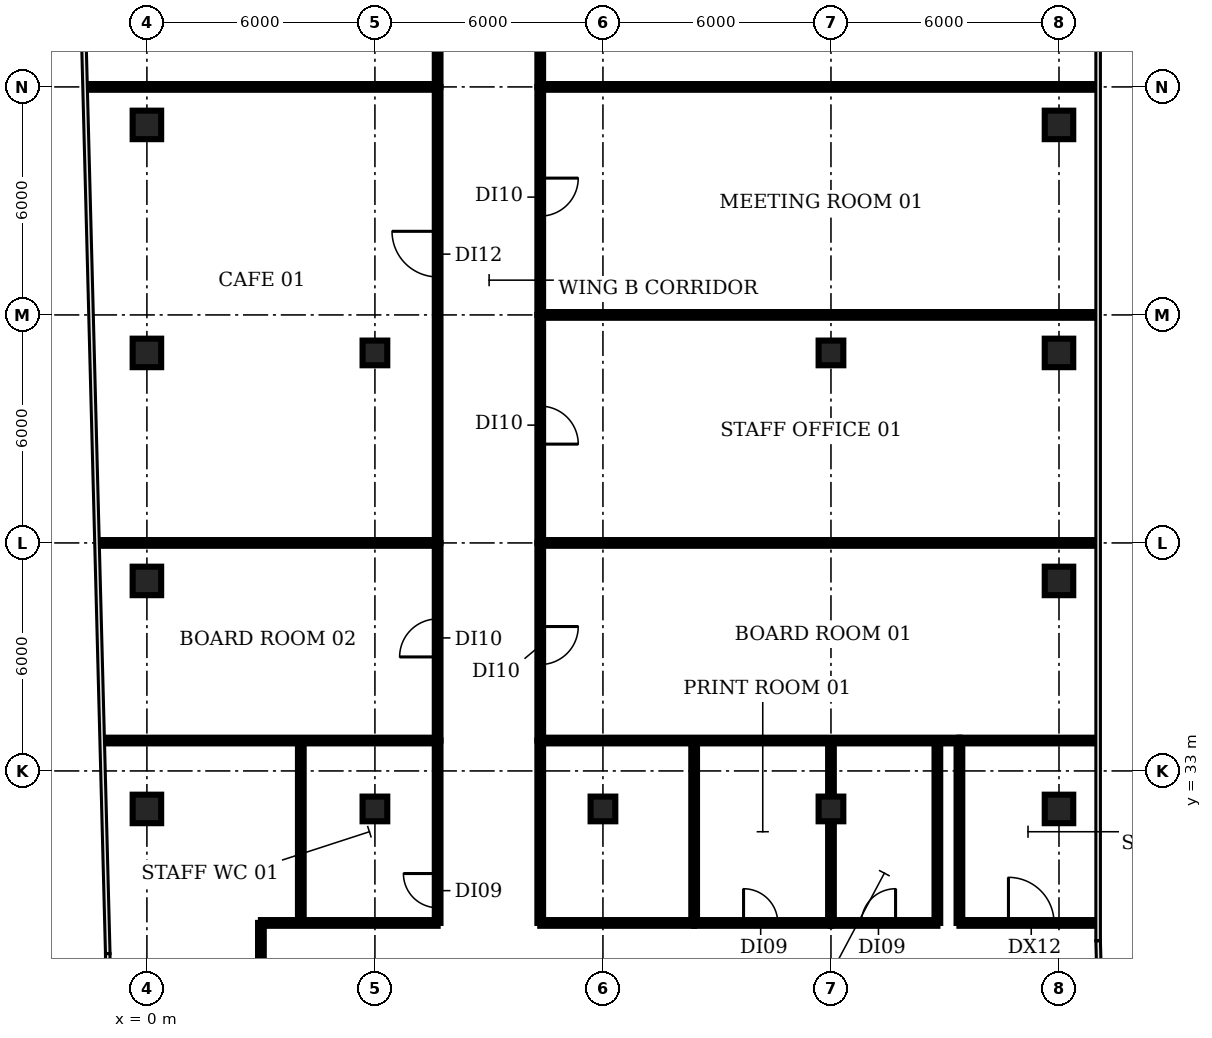
"""IFC4 building model, lengths in metres.
Left out: names, types, materials, properties, quantities, classifications, styles, units other than length and angle.
Written with IfcOpenShell. Run it as: python <this file> out.ifc"""

import sys

from ifc_helpers import new_model, si_unit, direction, frame, frame_2d, origin, origin_2d, place, context, subcontext, project, spatial, rectangle, extrude, element, fill, save


model = new_model("IFC4")
c1 = context("Model", 3, precision=1e-05, world=origin(), true_north=direction((0.0, 1.0)))
c2 = subcontext(c1, "Body", "Model", "MODEL_VIEW")
j1 = project(units=[si_unit("LENGTHUNIT", "METRE"), si_unit("PLANEANGLEUNIT", "RADIAN")], contexts=[c1])
p1 = place(None, origin())
s1 = spatial("IfcSite", under=j1, at=p1, CompositionType="ELEMENT")
p2 = place(p1, origin())
s2 = spatial("IfcBuilding", under=s1, at=p2, CompositionType="ELEMENT")
p3 = place(p2, frame((0.0, 0.0, 293.6)))
s3 = spatial("IfcBuildingStorey", under=s2, at=p3, CompositionType="ELEMENT", Elevation=293.6)
for number, where, z_axis, x_axis in (
    (1, (0.0, 32.0, 0.0), (0.0, 0.0, 1.0), (1.0, 0.0, 0.0)),
    (2, (0.0, 38.0, 0.0), (0.0, 0.0, 1.0), (1.0, 0.0, 0.0)),
    (3, (0.0, 44.0, 0.0), (0.0, 0.0, 1.0), (1.0, 0.0, 0.0)),
    (4, (0.0, 50.0, 0.0), (0.0, 0.0, 1.0), (1.0, 0.0, 0.0)),
):
    element("IfcColumn", number, at=place(p3, frame(where, z_axis=z_axis, x_axis=x_axis)), inside=s3, PredefinedType="COLUMN", context=c2, shape_type="SweptSolid", body=[
        extrude(rectangle(XDim=0.75, YDim=0.75, at=origin_2d()), origin(), (0.0, 0.0, 1.0), 3.85),
    ])
for number, where, z_axis, x_axis in (
    (5, (6.0, 32.0, 0.0), (0.0, 0.0, 1.0), (1.0, 0.0, 0.0)),
    (6, (6.0, 44.0, 0.0), (0.0, 0.0, 1.0), (1.0, 0.0, 0.0)),
    (7, (12.0, 32.0, 0.0), (0.0, 0.0, 1.0), (1.0, 0.0, 0.0)),
    (8, (18.0, 32.0, 0.0), (0.0, 0.0, 1.0), (1.0, 0.0, 0.0)),
    (9, (18.0, 44.0, 0.0), (0.0, 0.0, 1.0), (1.0, 0.0, 0.0)),
):
    element("IfcColumn", number, at=place(p3, frame(where, z_axis=z_axis, x_axis=x_axis)), inside=s3, PredefinedType="COLUMN", context=c2, shape_type="SweptSolid", body=[
        extrude(rectangle(XDim=0.65, YDim=0.65, at=origin_2d()), origin(), (0.0, 0.0, 1.0), 3.85),
    ])
for number, where, z_axis, x_axis in (
    (10, (24.0, 32.0, 0.0), (0.0, 0.0, 1.0), (1.0, 0.0, 0.0)),
    (11, (24.0, 38.0, 0.0), (0.0, 0.0, 1.0), (1.0, 0.0, 0.0)),
    (12, (24.0, 44.0, 0.0), (0.0, 0.0, 1.0), (1.0, 0.0, 0.0)),
    (13, (24.0, 50.0, 0.0), (0.0, 0.0, 1.0), (1.0, 0.0, 0.0)),
):
    element("IfcColumn", number, at=place(p3, frame(where, z_axis=z_axis, x_axis=x_axis)), inside=s3, PredefinedType="COLUMN", context=c2, shape_type="SweptSolid", body=[
        extrude(rectangle(XDim=0.75, YDim=0.75, at=origin_2d()), origin(), (0.0, 0.0, 1.0), 3.85),
    ])
p4 = place(p3, frame((-1.566, 51.0, 0.0), z_axis=(0.0, 0.0, 1.0), x_axis=(1.0, 0.0, 0.0)))
e14 = element("IfcWall", 14, at=p4, inside=s3, PredefinedType="PARTITIONING", context=c2, shape_type="SweptSolid", body=[
    extrude(rectangle(XDim=9.216, YDim=0.15, at=frame_2d((4.608, 0.0))), origin(), (0.0, 0.0, 1.0), 2.9),
])
p5 = place(p3, frame((-1.26, 39.0, 0.0), z_axis=(0.0, 0.0, 1.0), x_axis=(1.0, 0.0, 0.0)))
e15 = element("IfcWall", 15, at=p5, inside=s3, PredefinedType="PARTITIONING", context=c2, shape_type="SweptSolid", body=[
    extrude(rectangle(XDim=8.91, YDim=0.15, at=frame_2d((4.455, 0.0))), origin(), (0.0, 0.0, 1.0), 2.9),
])
p6 = place(p3, frame((-1.115, 33.8, 0.0), z_axis=(0.0, 0.0, 1.0), x_axis=(1.0, 0.0, 0.0)))
e16 = element("IfcWall", 16, at=p6, inside=s3, PredefinedType="PARTITIONING", context=c2, shape_type="SweptSolid", body=[
    extrude(rectangle(XDim=8.765, YDim=0.15, at=frame_2d((4.383, 0.0))), origin(), (0.0, 0.0, 1.0), 2.9),
])
p7 = place(p3, frame((3.0, 25.1, 0.0), z_axis=(0.0, 0.0, 1.0), x_axis=(0.0, 1.0, 0.0)))
e17 = element("IfcWall", 17, at=p7, inside=s3, PredefinedType="PARTITIONING", context=c2, shape_type="SweptSolid", body=[
    extrude(rectangle(XDim=3.9, YDim=0.15, at=frame_2d((1.95, 0.0))), origin(), (0.0, 0.0, 1.0), 2.9),
])
p8 = place(p3, frame((3.0, 29.0, 0.0), z_axis=(0.0, 0.0, 1.0), x_axis=(1.0, 0.0, 0.0)))
e18 = element("IfcWall", 18, at=p8, inside=s3, PredefinedType="PARTITIONING", context=c2, shape_type="SweptSolid", body=[
    extrude(rectangle(XDim=4.65, YDim=0.15, at=frame_2d((2.325, 0.0))), origin(), (0.0, 0.0, 1.0), 2.9),
])
p9 = place(p3, frame((4.05, 29.0, 0.0), z_axis=(0.0, 0.0, 1.0), x_axis=(0.0, 1.0, 0.0)))
e19 = element("IfcWall", 19, at=p9, inside=s3, PredefinedType="PARTITIONING", context=c2, shape_type="SweptSolid", body=[
    extrude(rectangle(XDim=4.8, YDim=0.15, at=frame_2d((2.4, 0.0))), origin(), (0.0, 0.0, 1.0), 2.9),
])
p10 = place(p3, frame((7.65, 29.0, 0.0), z_axis=(0.0, 0.0, 1.0), x_axis=(0.0, 1.0, 0.0)))
e20 = element("IfcWall", 20, at=p10, inside=s3, PredefinedType="PARTITIONING", context=c2, shape_type="SweptSolid", body=[
    extrude(rectangle(XDim=4.8, YDim=0.15, at=frame_2d((2.4, 0.0))), origin(), (0.0, 0.0, 1.0), 2.9),
])
p11 = place(p10, frame((0.4, 0.0, 0.0)))
e21 = element("IfcOpeningElement", 21, at=p11, cuts=e20, PredefinedType="OPENING", context=c2, shape_type="SweptSolid", body=[
    extrude(rectangle(XDim=0.9, YDim=2.1, at=frame_2d((0.45, 1.05))), frame((0.0, 0.085, 0.0), z_axis=(0.0, -1.0, 0.0), x_axis=(1.0, 0.0, 0.0)), (0.0, 0.0, 1.0), 0.17),
])
p12 = place(p3, frame((7.65, 33.8, 0.0), z_axis=(0.0, 0.0, 1.0), x_axis=(0.0, 1.0, 0.0)))
e22 = element("IfcWall", 22, at=p12, inside=s3, PredefinedType="PARTITIONING", context=c2, shape_type="SweptSolid", body=[
    extrude(rectangle(XDim=5.2, YDim=0.15, at=frame_2d((2.6, 0.0))), origin(), (0.0, 0.0, 1.0), 2.9),
])
p13 = place(p12, frame((2.2, 0.0, 0.0)))
e23 = element("IfcOpeningElement", 23, at=p13, cuts=e22, PredefinedType="OPENING", context=c2, shape_type="SweptSolid", body=[
    extrude(rectangle(XDim=1.0, YDim=2.1, at=frame_2d((0.5, 1.05))), frame((0.0, 0.085, 0.0), z_axis=(0.0, -1.0, 0.0), x_axis=(1.0, 0.0, 0.0)), (0.0, 0.0, 1.0), 0.17),
])
p14 = place(p3, frame((7.65, 39.0, 0.0), z_axis=(0.0, 0.0, 1.0), x_axis=(0.0, 1.0, 0.0)))
e24 = element("IfcWall", 24, at=p14, inside=s3, PredefinedType="PARTITIONING", context=c2, shape_type="SweptSolid", body=[
    extrude(rectangle(XDim=12.0, YDim=0.15, at=frame_2d((6.0, 0.0))), origin(), (0.0, 0.0, 1.0), 2.9),
])
p15 = place(p14, frame((7.0, 0.0, 0.0)))
e25 = element("IfcOpeningElement", 25, at=p15, cuts=e24, PredefinedType="OPENING", context=c2, shape_type="SweptSolid", body=[
    extrude(rectangle(XDim=1.2, YDim=2.1, at=frame_2d((0.6, 1.05))), frame((0.0, 0.085, 0.0), z_axis=(0.0, -1.0, 0.0), x_axis=(1.0, 0.0, 0.0)), (0.0, 0.0, 1.0), 0.17),
])
p16 = place(p3, frame((7.65, 51.0, 0.0), z_axis=(0.0, 0.0, 1.0), x_axis=(0.0, 1.0, 0.0)))
e26 = element("IfcWall", 26, at=p16, inside=s3, PredefinedType="PARTITIONING", context=c2, shape_type="SweptSolid", body=[
    extrude(rectangle(XDim=6.0, YDim=0.15, at=frame_2d((3.0, 0.0))), origin(), (0.0, 0.0, 1.0), 2.9),
])
p17 = place(p16, frame((1.8, 0.0, 0.0)))
e27 = element("IfcOpeningElement", 27, at=p17, cuts=e26, PredefinedType="OPENING", context=c2, shape_type="SweptSolid", body=[
    extrude(rectangle(XDim=1.0, YDim=2.1, at=frame_2d((0.5, 1.05))), frame((0.0, 0.085, 0.0), z_axis=(0.0, -1.0, 0.0), x_axis=(1.0, 0.0, 0.0)), (0.0, 0.0, 1.0), 0.17),
])
p18 = place(p3, frame((10.35, 29.0, 0.0), z_axis=(0.0, 0.0, 1.0), x_axis=(0.0, 1.0, 0.0)))
e28 = element("IfcWall", 28, at=p18, inside=s3, PredefinedType="PARTITIONING", context=c2, shape_type="SweptSolid", body=[
    extrude(rectangle(XDim=4.8, YDim=0.15, at=frame_2d((2.4, 0.0))), origin(), (0.0, 0.0, 1.0), 2.9),
])
p19 = place(p3, frame((10.35, 29.0, 0.0), z_axis=(0.0, 0.0, 1.0), x_axis=(1.0, 0.0, 0.0)))
e29 = element("IfcWall", 29, at=p19, inside=s3, PredefinedType="PARTITIONING", context=c2, shape_type="SweptSolid", body=[
    extrude(rectangle(XDim=4.05, YDim=0.15, at=frame_2d((2.025, 0.0))), origin(), (0.0, 0.0, 1.0), 2.9),
])
p20 = place(p3, frame((10.35, 33.8, 0.0), z_axis=(0.0, 0.0, 1.0), x_axis=(1.0, 0.0, 0.0)))
e30 = element("IfcWall", 30, at=p20, inside=s3, PredefinedType="PARTITIONING", context=c2, shape_type="SweptSolid", body=[
    extrude(rectangle(XDim=11.03, YDim=0.15, at=frame_2d((5.515, 0.0))), origin(), (0.0, 0.0, 1.0), 2.9),
])
p21 = place(p3, frame((10.35, 39.0, 0.0), z_axis=(0.0, 0.0, 1.0), x_axis=(0.0, -1.0, 0.0)))
e31 = element("IfcWall", 31, at=p21, inside=s3, PredefinedType="PARTITIONING", context=c2, shape_type="SweptSolid", body=[
    extrude(rectangle(XDim=5.2, YDim=0.15, at=frame_2d((2.6, 0.0))), origin(), (0.0, 0.0, 1.0), 2.9),
])
p22 = place(p21, frame((2.2, 0.0, 0.0)))
e32 = element("IfcOpeningElement", 32, at=p22, cuts=e31, PredefinedType="OPENING", context=c2, shape_type="SweptSolid", body=[
    extrude(rectangle(XDim=1.0, YDim=2.1, at=frame_2d((0.5, 1.05))), frame((0.0, 0.085, 0.0), z_axis=(0.0, -1.0, 0.0), x_axis=(1.0, 0.0, 0.0)), (0.0, 0.0, 1.0), 0.17),
])
p23 = place(p3, frame((10.35, 39.0, 0.0), z_axis=(0.0, 0.0, 1.0), x_axis=(1.0, 0.0, 0.0)))
e33 = element("IfcWall", 33, at=p23, inside=s3, PredefinedType="PARTITIONING", context=c2, shape_type="SweptSolid", body=[
    extrude(rectangle(XDim=14.63, YDim=0.15, at=frame_2d((7.315, 0.0))), origin(), (0.0, 0.0, 1.0), 2.9),
])
p24 = place(p3, frame((10.35, 45.0, 0.0), z_axis=(0.0, 0.0, 1.0), x_axis=(0.0, -1.0, 0.0)))
e34 = element("IfcWall", 34, at=p24, inside=s3, PredefinedType="PARTITIONING", context=c2, shape_type="SweptSolid", body=[
    extrude(rectangle(XDim=6.0, YDim=0.15, at=frame_2d((3.0, 0.0))), origin(), (0.0, 0.0, 1.0), 2.9),
])
p25 = place(p24, frame((2.4, 0.0, 0.0)))
e35 = element("IfcOpeningElement", 35, at=p25, cuts=e34, PredefinedType="OPENING", context=c2, shape_type="SweptSolid", body=[
    extrude(rectangle(XDim=1.0, YDim=2.1, at=frame_2d((0.5, 1.05))), frame((0.0, 0.085, 0.0), z_axis=(0.0, -1.0, 0.0), x_axis=(1.0, 0.0, 0.0)), (0.0, 0.0, 1.0), 0.17),
])
p26 = place(p3, frame((10.35, 45.0, 0.0), z_axis=(0.0, 0.0, 1.0), x_axis=(1.0, 0.0, 0.0)))
e36 = element("IfcWall", 36, at=p26, inside=s3, PredefinedType="PARTITIONING", context=c2, shape_type="SweptSolid", body=[
    extrude(rectangle(XDim=14.63, YDim=0.15, at=frame_2d((7.315, 0.0))), origin(), (0.0, 0.0, 1.0), 2.9),
])
p27 = place(p3, frame((10.35, 51.0, 0.0), z_axis=(0.0, 0.0, 1.0), x_axis=(0.0, -1.0, 0.0)))
e37 = element("IfcWall", 37, at=p27, inside=s3, PredefinedType="PARTITIONING", context=c2, shape_type="SweptSolid", body=[
    extrude(rectangle(XDim=6.0, YDim=0.15, at=frame_2d((3.0, 0.0))), origin(), (0.0, 0.0, 1.0), 2.9),
])
p28 = place(p27, frame((2.4, 0.0, 0.0)))
e38 = element("IfcOpeningElement", 38, at=p28, cuts=e37, PredefinedType="OPENING", context=c2, shape_type="SweptSolid", body=[
    extrude(rectangle(XDim=1.0, YDim=2.1, at=frame_2d((0.5, 1.05))), frame((0.0, 0.085, 0.0), z_axis=(0.0, -1.0, 0.0), x_axis=(1.0, 0.0, 0.0)), (0.0, 0.0, 1.0), 0.17),
])
p29 = place(p3, frame((10.35, 51.0, 0.0), z_axis=(0.0, 0.0, 1.0), x_axis=(1.0, 0.0, 0.0)))
e39 = element("IfcWall", 39, at=p29, inside=s3, PredefinedType="PARTITIONING", context=c2, shape_type="SweptSolid", body=[
    extrude(rectangle(XDim=14.63, YDim=0.15, at=frame_2d((7.315, 0.0))), origin(), (0.0, 0.0, 1.0), 2.9),
])
p30 = place(p3, frame((10.35, 63.005, 0.0), z_axis=(0.0, 0.0, 1.0), x_axis=(0.0, -1.0, 0.0)))
e40 = element("IfcWall", 40, at=p30, inside=s3, PredefinedType="PARTITIONING", context=c2, shape_type="SweptSolid", body=[
    extrude(rectangle(XDim=12.005, YDim=0.15, at=frame_2d((6.002, 0.0))), origin(), (0.0, 0.0, 1.0), 2.9),
])
p31 = place(p30, frame((5.505, 0.0, 0.0)))
e41 = element("IfcOpeningElement", 41, at=p31, cuts=e40, PredefinedType="OPENING", context=c2, shape_type="SweptSolid", body=[
    extrude(rectangle(XDim=1.2, YDim=2.1, at=frame_2d((0.6, 1.05))), frame((0.0, 0.085, 0.0), z_axis=(0.0, -1.0, 0.0), x_axis=(1.0, 0.0, 0.0)), (0.0, 0.0, 1.0), 0.17),
])
p32 = place(p3, frame((14.4, 29.0, 0.0), z_axis=(0.0, 0.0, 1.0), x_axis=(0.0, 1.0, 0.0)))
e42 = element("IfcWall", 42, at=p32, inside=s3, PredefinedType="PARTITIONING", context=c2, shape_type="SweptSolid", body=[
    extrude(rectangle(XDim=4.8, YDim=0.15, at=frame_2d((2.4, 0.0))), origin(), (0.0, 0.0, 1.0), 2.9),
])
p33 = place(p3, frame((14.4, 29.0, 0.0), z_axis=(0.0, 0.0, 1.0), x_axis=(1.0, 0.0, 0.0)))
e43 = element("IfcWall", 43, at=p33, inside=s3, PredefinedType="PARTITIONING", context=c2, shape_type="SweptSolid", body=[
    extrude(rectangle(XDim=3.6, YDim=0.15, at=frame_2d((1.8, 0.0))), origin(), (0.0, 0.0, 1.0), 2.9),
])
p34 = place(p33, frame((1.3, 0.0, 0.0)))
e44 = element("IfcOpeningElement", 44, at=p34, cuts=e43, PredefinedType="OPENING", context=c2, shape_type="SweptSolid", body=[
    extrude(rectangle(XDim=0.9, YDim=2.1, at=frame_2d((0.45, 1.05))), frame((0.0, 0.085, 0.0), z_axis=(0.0, -1.0, 0.0), x_axis=(1.0, 0.0, 0.0)), (0.0, 0.0, 1.0), 0.17),
])
p35 = place(p3, frame((18.0, 29.0, 0.0), z_axis=(0.0, 0.0, 1.0), x_axis=(0.0, 1.0, 0.0)))
e45 = element("IfcWall", 45, at=p35, inside=s3, PredefinedType="PARTITIONING", context=c2, shape_type="SweptSolid", body=[
    extrude(rectangle(XDim=4.8, YDim=0.15, at=frame_2d((2.4, 0.0))), origin(), (0.0, 0.0, 1.0), 2.9),
])
p36 = place(p3, frame((18.0, 29.0, 0.0), z_axis=(0.0, 0.0, 1.0), x_axis=(1.0, 0.0, 0.0)))
e46 = element("IfcWall", 46, at=p36, inside=s3, PredefinedType="PARTITIONING", context=c2, shape_type="SweptSolid", body=[
    extrude(rectangle(XDim=2.8, YDim=0.15, at=frame_2d((1.4, 0.0))), origin(), (0.0, 0.0, 1.0), 2.9),
])
p37 = place(p36, frame((0.8, 0.0, 0.0)))
e47 = element("IfcOpeningElement", 47, at=p37, cuts=e46, PredefinedType="OPENING", context=c2, shape_type="SweptSolid", body=[
    extrude(rectangle(XDim=0.9, YDim=2.1, at=frame_2d((0.45, 1.05))), frame((0.0, 0.085, 0.0), z_axis=(0.0, -1.0, 0.0), x_axis=(1.0, 0.0, 0.0)), (0.0, 0.0, 1.0), 0.17),
])
for number, where, z_axis, x_axis in (
    (48, (20.8, 29.0, 0.0), (0.0, 0.0, 1.0), (0.0, 1.0, 0.0)),
    (49, (21.38, 29.0, 0.0), (0.0, 0.0, 1.0), (0.0, 1.0, 0.0)),
):
    element("IfcWall", number, at=place(p3, frame(where, z_axis=z_axis, x_axis=x_axis)), inside=s3, PredefinedType="PARTITIONING", context=c2, shape_type="SweptSolid", body=[
        extrude(rectangle(XDim=4.8, YDim=0.15, at=frame_2d((2.4, 0.0))), origin(), (0.0, 0.0, 1.0), 2.9),
    ])
p38 = place(p3, frame((21.38, 29.0, 0.0), z_axis=(0.0, 0.0, 1.0), x_axis=(1.0, 0.0, 0.0)))
e50 = element("IfcWall", 50, at=p38, inside=s3, PredefinedType="PARTITIONING", context=c2, shape_type="SweptSolid", body=[
    extrude(rectangle(XDim=3.59, YDim=0.15, at=frame_2d((1.795, 0.0))), origin(), (0.0, 0.0, 1.0), 2.9),
])
p39 = place(p38, frame((1.29, 0.0, 0.0)))
e51 = element("IfcOpeningElement", 51, at=p39, cuts=e50, PredefinedType="OPENING", context=c2, shape_type="SweptSolid", body=[
    extrude(rectangle(XDim=1.2, YDim=2.1, at=frame_2d((0.6, 1.05))), frame((0.0, 0.085, 0.0), z_axis=(0.0, -1.0, 0.0), x_axis=(1.0, 0.0, 0.0)), (0.0, 0.0, 1.0), 0.17),
])
p40 = place(p3, frame((21.38, 33.8, 0.0), z_axis=(0.0, 0.0, 1.0), x_axis=(1.0, 0.0, 0.0)))
e52 = element("IfcWall", 52, at=p40, inside=s3, PredefinedType="PARTITIONING", context=c2, shape_type="SweptSolid", body=[
    extrude(rectangle(XDim=3.6, YDim=0.15, at=frame_2d((1.8, 0.0))), origin(), (0.0, 0.0, 1.0), 2.9),
])
p41 = place(p11, origin())
e53 = element("IfcDoor", 53, at=p41, inside=s3, OperationType="SINGLE_SWING_RIGHT", PredefinedType="DOOR", context=c2, shape_type="SweptSolid", body=[
    extrude(rectangle(XDim=0.9, YDim=2.1, at=frame_2d((0.45, 1.05))), frame((0.0, 0.025, 0.0), z_axis=(0.0, -1.0, 0.0), x_axis=(1.0, 0.0, 0.0)), (0.0, 0.0, 1.0), 0.05),
])
fill(e21, e53)
p42 = place(p13, origin())
e54 = element("IfcDoor", 54, at=p42, inside=s3, OperationType="SINGLE_SWING_LEFT", PredefinedType="DOOR", context=c2, shape_type="SweptSolid", body=[
    extrude(rectangle(XDim=1.0, YDim=2.1, at=frame_2d((0.5, 1.05))), frame((0.0, 0.025, 0.0), z_axis=(0.0, -1.0, 0.0), x_axis=(1.0, 0.0, 0.0)), (0.0, 0.0, 1.0), 0.05),
])
fill(e23, e54)
p43 = place(p15, origin())
e55 = element("IfcDoor", 55, at=p43, inside=s3, OperationType="SINGLE_SWING_RIGHT", PredefinedType="DOOR", context=c2, shape_type="SweptSolid", body=[
    extrude(rectangle(XDim=1.2, YDim=2.1, at=frame_2d((0.6, 1.05))), frame((0.0, 0.025, 0.0), z_axis=(0.0, -1.0, 0.0), x_axis=(1.0, 0.0, 0.0)), (0.0, 0.0, 1.0), 0.05),
])
fill(e25, e55)
p44 = place(p22, origin())
e56 = element("IfcDoor", 56, at=p44, inside=s3, OperationType="SINGLE_SWING_LEFT", PredefinedType="DOOR", context=c2, shape_type="SweptSolid", body=[
    extrude(rectangle(XDim=1.0, YDim=2.1, at=frame_2d((0.5, 1.05))), frame((0.0, 0.025, 0.0), z_axis=(0.0, -1.0, 0.0), x_axis=(1.0, 0.0, 0.0)), (0.0, 0.0, 1.0), 0.05),
])
fill(e32, e56)
p45 = place(p25, origin())
e57 = element("IfcDoor", 57, at=p45, inside=s3, OperationType="SINGLE_SWING_RIGHT", PredefinedType="DOOR", context=c2, shape_type="SweptSolid", body=[
    extrude(rectangle(XDim=1.0, YDim=2.1, at=frame_2d((0.5, 1.05))), frame((0.0, 0.025, 0.0), z_axis=(0.0, -1.0, 0.0), x_axis=(1.0, 0.0, 0.0)), (0.0, 0.0, 1.0), 0.05),
])
fill(e35, e57)
p46 = place(p28, origin())
e58 = element("IfcDoor", 58, at=p46, inside=s3, OperationType="SINGLE_SWING_LEFT", PredefinedType="DOOR", context=c2, shape_type="SweptSolid", body=[
    extrude(rectangle(XDim=1.0, YDim=2.1, at=frame_2d((0.5, 1.05))), frame((0.0, 0.025, 0.0), z_axis=(0.0, -1.0, 0.0), x_axis=(1.0, 0.0, 0.0)), (0.0, 0.0, 1.0), 0.05),
])
fill(e38, e58)
p47 = place(p34, origin())
e59 = element("IfcDoor", 59, at=p47, inside=s3, OperationType="SINGLE_SWING_LEFT", PredefinedType="DOOR", context=c2, shape_type="SweptSolid", body=[
    extrude(rectangle(XDim=0.9, YDim=2.1, at=frame_2d((0.45, 1.05))), frame((0.0, 0.025, 0.0), z_axis=(0.0, -1.0, 0.0), x_axis=(1.0, 0.0, 0.0)), (0.0, 0.0, 1.0), 0.05),
])
fill(e44, e59)
p48 = place(p37, origin())
e60 = element("IfcDoor", 60, at=p48, inside=s3, OperationType="SINGLE_SWING_RIGHT", PredefinedType="DOOR", context=c2, shape_type="SweptSolid", body=[
    extrude(rectangle(XDim=0.9, YDim=2.1, at=frame_2d((0.45, 1.05))), frame((0.0, 0.025, 0.0), z_axis=(0.0, -1.0, 0.0), x_axis=(1.0, 0.0, 0.0)), (0.0, 0.0, 1.0), 0.05),
])
fill(e47, e60)
p49 = place(p39, origin())
e61 = element("IfcDoor", 61, at=p49, inside=s3, OperationType="SINGLE_SWING_LEFT", PredefinedType="DOOR", context=c2, shape_type="SweptSolid", body=[
    extrude(rectangle(XDim=1.2, YDim=2.1, at=frame_2d((0.6, 1.05))), frame((0.0, 0.025, 0.0), z_axis=(0.0, -1.0, 0.0), x_axis=(1.0, 0.0, 0.0)), (0.0, 0.0, 1.0), 0.05),
])
fill(e51, e61)
save(model, sys.argv[1])
